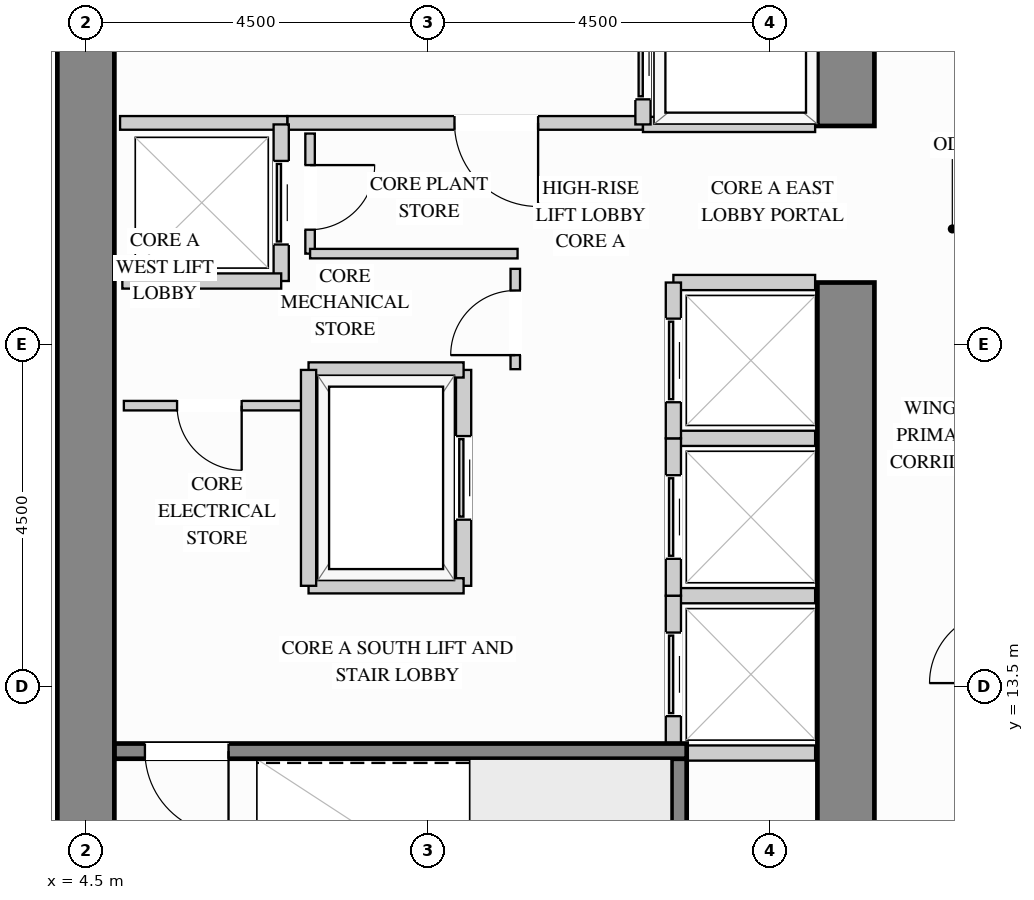
"""IFC4 building model, lengths in metres.
Left out: names, types, materials, properties, quantities, classifications, styles, units other than length and angle.
Written with IfcOpenShell. Run it as: python <this file> out.ifc"""

import sys

from ifc_helpers import new_model, si_unit, direction, frame, frame_2d, origin, place, context, subcontext, project, spatial, rectangle, extrude, source, transform, mapped, element, fill, save


model = new_model("IFC4")
c1 = context("Model", 3, precision=1e-05, world=origin(), true_north=direction((0.0, 1.0)))
c2 = subcontext(c1, "Body", "Model", "MODEL_VIEW")
j1 = project(units=[si_unit("LENGTHUNIT", "METRE"), si_unit("PLANEANGLEUNIT", "RADIAN")], contexts=[c1])
p1 = place(None, origin())
s1 = spatial("IfcSite", under=j1, at=p1, CompositionType="ELEMENT")
p2 = place(p1, origin())
s2 = spatial("IfcBuilding", under=s1, at=p2, CompositionType="ELEMENT")
p3 = place(p2, frame((0.0, 0.0, 99.0)))
s3 = spatial("IfcBuildingStorey", under=s2, at=p3, CompositionType="ELEMENT", Elevation=99.0)
m1 = source(origin(), c2, "Body", "SweptSolid", [
    extrude(rectangle(XDim=9.945, YDim=0.75, at=frame_2d((4.973, 0.0))), origin(), (0.0, 0.0, 1.0), 3.38),
])
p4 = place(p3, frame((14.5, 8.875, 0.0), z_axis=(0.0, 0.0, 1.0), x_axis=(0.0, 1.0, 0.0)))
e1 = element("IfcWall", 1, at=p4, inside=s3, PredefinedType="SHEAR", context=c2, shape_type="MappedRepresentation", body=[
    mapped(m1, transform((0.0, 0.0, 0.0), x_axis=(1.0, 0.0, 0.0), y_axis=(0.0, 1.0, 0.0), z_axis=(0.0, 0.0, 1.0))),
])
m2 = source(origin(), c2, "Body", "SweptSolid", [
    extrude(rectangle(XDim=8.245, YDim=0.75, at=frame_2d((4.123, 0.0))), origin(), (0.0, 0.0, 1.0), 3.38),
])
p5 = place(p3, frame((14.5, 20.88, 0.0), z_axis=(0.0, 0.0, 1.0), x_axis=(0.0, 1.0, 0.0)))
e2 = element("IfcWall", 2, at=p5, inside=s3, PredefinedType="SHEAR", context=c2, shape_type="MappedRepresentation", body=[
    mapped(m2, transform((0.0, 0.0, 0.0), x_axis=(1.0, 0.0, 0.0), y_axis=(0.0, 1.0, 0.0), z_axis=(0.0, 0.0, 1.0))),
])
m3 = source(origin(), c2, "Body", "SweptSolid", [
    extrude(rectangle(XDim=20.25, YDim=0.75, at=frame_2d((10.125, 0.0))), origin(), (0.0, 0.0, 1.0), 3.38),
])
p6 = place(p3, frame((4.5, 8.875, 0.0), z_axis=(0.0, 0.0, 1.0), x_axis=(0.0, 1.0, 0.0)))
e3 = element("IfcWall", 3, at=p6, inside=s3, PredefinedType="SHEAR", context=c2, shape_type="MappedRepresentation", body=[
    mapped(m3, transform((0.0, 0.0, 0.0), x_axis=(1.0, 0.0, 0.0), y_axis=(0.0, 1.0, 0.0), z_axis=(0.0, 0.0, 1.0))),
])
p7 = place(p3, frame((7.15, 20.92, 0.0), z_axis=(0.0, 0.0, 1.0), x_axis=(1.0, 0.0, 0.0)))
e4 = element("IfcWall", 4, at=p7, inside=s3, PredefinedType="PARTITIONING", context=c2, shape_type="SweptSolid", body=[
    extrude(rectangle(XDim=4.68, YDim=0.18, at=frame_2d((2.34, 0.0))), origin(), (0.0, 0.0, 1.0), 3.365),
])
p8 = place(p7, frame((2.2, 0.0, 0.0)))
e5 = element("IfcOpeningElement", 5, at=p8, cuts=e4, PredefinedType="OPENING", context=c2, shape_type="SweptSolid", body=[
    extrude(rectangle(XDim=1.1, YDim=2.15, at=frame_2d((0.55, 1.075))), frame((0.0, 0.1, 0.0), z_axis=(0.0, -1.0, 0.0), x_axis=(1.0, 0.0, 0.0)), (0.0, 0.0, 1.0), 0.2),
])
m4 = source(origin(), c2, "Body", "SweptSolid", [
    extrude(rectangle(XDim=2.2, YDim=0.18, at=frame_2d((1.1, 0.0))), origin(), (0.0, 0.0, 1.0), 3.365),
])
p9 = place(p3, frame((4.95, 20.92, 0.0), z_axis=(0.0, 0.0, 1.0), x_axis=(1.0, 0.0, 0.0)))
e6 = element("IfcWall", 6, at=p9, inside=s3, PredefinedType="PARTITIONING", context=c2, shape_type="MappedRepresentation", body=[
    mapped(m4, transform((0.0, 0.0, 0.0), x_axis=(1.0, 0.0, 0.0), y_axis=(0.0, 1.0, 0.0), z_axis=(0.0, 0.0, 1.0))),
])
p10 = place(p3, frame((10.15, 17.68, 0.0), z_axis=(0.0, 0.0, 1.0), x_axis=(0.0, 1.0, 0.0)))
e7 = element("IfcWall", 7, at=p10, inside=s3, PredefinedType="PARTITIONING", context=c2, shape_type="SweptSolid", body=[
    extrude(rectangle(XDim=1.32, YDim=0.125, at=frame_2d((0.66, 0.0))), origin(), (0.0, 0.0, 1.0), 3.365),
])
p11 = place(p10, frame((0.185, 0.0, 0.0)))
e8 = element("IfcOpeningElement", 8, at=p11, cuts=e7, PredefinedType="OPENING", context=c2, shape_type="SweptSolid", body=[
    extrude(rectangle(XDim=0.85, YDim=2.1, at=frame_2d((0.425, 1.05))), frame((0.0, 0.073, 0.0), z_axis=(0.0, -1.0, 0.0), x_axis=(1.0, 0.0, 0.0)), (0.0, 0.0, 1.0), 0.145),
])
p12 = place(p3, frame((7.45, 19.2, 0.0), z_axis=(0.0, 0.0, 1.0), x_axis=(0.0, 1.0, 0.0)))
e9 = element("IfcWall", 9, at=p12, inside=s3, PredefinedType="PARTITIONING", context=c2, shape_type="SweptSolid", body=[
    extrude(rectangle(XDim=1.58, YDim=0.125, at=frame_2d((0.79, 0.0))), origin(), (0.0, 0.0, 1.0), 3.365),
])
p13 = place(p12, frame((0.315, 0.0, 0.0)))
e10 = element("IfcOpeningElement", 10, at=p13, cuts=e9, PredefinedType="OPENING", context=c2, shape_type="SweptSolid", body=[
    extrude(rectangle(XDim=0.85, YDim=2.1, at=frame_2d((0.425, 1.05))), frame((0.0, 0.073, 0.0), z_axis=(0.0, -1.0, 0.0), x_axis=(1.0, 0.0, 0.0)), (0.0, 0.0, 1.0), 0.145),
])
m5 = source(origin(), c2, "Body", "SweptSolid", [
    extrude(rectangle(XDim=2.73, YDim=0.125, at=frame_2d((1.365, 0.0))), origin(), (0.0, 0.0, 1.0), 3.365),
])
p14 = place(p3, frame((7.45, 19.2, 0.0), z_axis=(0.0, 0.0, 1.0), x_axis=(1.0, 0.0, 0.0)))
e11 = element("IfcWall", 11, at=p14, inside=s3, PredefinedType="PARTITIONING", context=c2, shape_type="MappedRepresentation", body=[
    mapped(m5, transform((0.0, 0.0, 0.0), x_axis=(1.0, 0.0, 0.0), y_axis=(0.0, 1.0, 0.0), z_axis=(0.0, 0.0, 1.0))),
])
p15 = place(p3, frame((5.0, 17.2, 0.0), z_axis=(0.0, 0.0, 1.0), x_axis=(1.0, 0.0, 0.0)))
e12 = element("IfcWall", 12, at=p15, inside=s3, PredefinedType="PARTITIONING", context=c2, shape_type="SweptSolid", body=[
    extrude(rectangle(XDim=2.4, YDim=0.125, at=frame_2d((1.2, 0.0))), origin(), (0.0, 0.0, 1.0), 3.365),
])
p16 = place(p15, frame((0.7, 0.0, 0.0)))
e13 = element("IfcOpeningElement", 13, at=p16, cuts=e12, PredefinedType="OPENING", context=c2, shape_type="SweptSolid", body=[
    extrude(rectangle(XDim=0.85, YDim=2.1, at=frame_2d((0.425, 1.05))), frame((0.0, 0.073, 0.0), z_axis=(0.0, -1.0, 0.0), x_axis=(1.0, 0.0, 0.0)), (0.0, 0.0, 1.0), 0.145),
])
m6 = source(origin(), c2, "Body", "SweptSolid", [
    extrude(rectangle(XDim=2.265, YDim=0.2, at=frame_2d((1.132, 0.0))), origin(), (0.0, 0.0, 1.0), 3.365),
])
p17 = place(p3, frame((11.83, 20.9, 0.0), z_axis=(0.0, 0.0, 1.0), x_axis=(1.0, 0.0, 0.0)))
e14 = element("IfcWall", 14, at=p17, inside=s3, PredefinedType="PARTITIONING", context=c2, shape_type="MappedRepresentation", body=[
    mapped(m6, transform((0.0, 0.0, 0.0), x_axis=(1.0, 0.0, 0.0), y_axis=(0.0, 1.0, 0.0), z_axis=(0.0, 0.0, 1.0))),
])
p18 = place(p3, frame((11.83, 20.9, 0.0), z_axis=(0.0, 0.0, 1.0), x_axis=(0.0, 1.0, 0.0)))
e15 = element("IfcWall", 15, at=p18, inside=s3, PredefinedType="PARTITIONING", context=c2, shape_type="SweptSolid", body=[
    extrude(rectangle(XDim=1.76, YDim=0.2, at=frame_2d((0.88, 0.0))), origin(), (0.0, 0.0, 1.0), 3.365),
])
p19 = place(p18, frame((0.33, 0.0, 0.0)))
e16 = element("IfcOpeningElement", 16, at=p19, cuts=e15, PredefinedType="OPENING", context=c2, shape_type="SweptSolid", body=[
    extrude(rectangle(XDim=1.1, YDim=2.2, at=frame_2d((0.55, 1.1))), frame((0.0, 0.11, 0.0), z_axis=(0.0, -1.0, 0.0), x_axis=(1.0, 0.0, 0.0)), (0.0, 0.0, 1.0), 0.22),
])
m7 = source(origin(), c2, "Body", "SweptSolid", [
    extrude(rectangle(XDim=1.865, YDim=0.2, at=frame_2d((0.933, 0.0))), origin(), (0.0, 0.0, 1.0), 3.365),
])
for number, where, z_axis, x_axis in (
    (17, (12.23, 14.7, 0.0), (0.0, 0.0, 1.0), (1.0, 0.0, 0.0)),
    (18, (12.23, 12.63, 0.0), (0.0, 0.0, 1.0), (1.0, 0.0, 0.0)),
):
    element("IfcWall", number, at=place(p3, frame(where, z_axis=z_axis, x_axis=x_axis)), inside=s3, PredefinedType="PARTITIONING", context=c2, shape_type="MappedRepresentation", body=[
        mapped(m7, transform((0.0, 0.0, 0.0), x_axis=(1.0, 0.0, 0.0), y_axis=(0.0, 1.0, 0.0), z_axis=(0.0, 0.0, 1.0))),
    ])
p20 = place(p3, frame((12.23, 12.63, 0.0), z_axis=(0.0, 0.0, 1.0), x_axis=(0.0, 1.0, 0.0)))
e19 = element("IfcWall", 19, at=p20, inside=s3, PredefinedType="PARTITIONING", context=c2, shape_type="SweptSolid", body=[
    extrude(rectangle(XDim=2.07, YDim=0.2, at=frame_2d((1.035, 0.0))), origin(), (0.0, 0.0, 1.0), 3.365),
])
p21 = place(p20, frame((0.485, 0.0, 0.0)))
e20 = element("IfcOpeningElement", 20, at=p21, cuts=e19, PredefinedType="OPENING", context=c2, shape_type="SweptSolid", body=[
    extrude(rectangle(XDim=1.1, YDim=2.2, at=frame_2d((0.55, 1.1))), frame((0.0, 0.11, 0.0), z_axis=(0.0, -1.0, 0.0), x_axis=(1.0, 0.0, 0.0)), (0.0, 0.0, 1.0), 0.22),
])
p22 = place(p3, frame((12.23, 16.77, 0.0), z_axis=(0.0, 0.0, 1.0), x_axis=(1.0, 0.0, 0.0)))
e21 = element("IfcWall", 21, at=p22, inside=s3, PredefinedType="PARTITIONING", context=c2, shape_type="MappedRepresentation", body=[
    mapped(m7, transform((0.0, 0.0, 0.0), x_axis=(1.0, 0.0, 0.0), y_axis=(0.0, 1.0, 0.0), z_axis=(0.0, 0.0, 1.0))),
])
p23 = place(p3, frame((12.23, 14.7, 0.0), z_axis=(0.0, 0.0, 1.0), x_axis=(0.0, 1.0, 0.0)))
e22 = element("IfcWall", 22, at=p23, inside=s3, PredefinedType="PARTITIONING", context=c2, shape_type="SweptSolid", body=[
    extrude(rectangle(XDim=2.07, YDim=0.2, at=frame_2d((1.035, 0.0))), origin(), (0.0, 0.0, 1.0), 3.365),
])
p24 = place(p23, frame((0.485, 0.0, 0.0)))
e23 = element("IfcOpeningElement", 23, at=p24, cuts=e22, PredefinedType="OPENING", context=c2, shape_type="SweptSolid", body=[
    extrude(rectangle(XDim=1.1, YDim=2.2, at=frame_2d((0.55, 1.1))), frame((0.0, 0.11, 0.0), z_axis=(0.0, -1.0, 0.0), x_axis=(1.0, 0.0, 0.0)), (0.0, 0.0, 1.0), 0.22),
])
p25 = place(p3, frame((12.23, 18.82, 0.0), z_axis=(0.0, 0.0, 1.0), x_axis=(1.0, 0.0, 0.0)))
e24 = element("IfcWall", 24, at=p25, inside=s3, PredefinedType="PARTITIONING", context=c2, shape_type="MappedRepresentation", body=[
    mapped(m7, transform((0.0, 0.0, 0.0), x_axis=(1.0, 0.0, 0.0), y_axis=(0.0, 1.0, 0.0), z_axis=(0.0, 0.0, 1.0))),
])
p26 = place(p3, frame((12.23, 16.77, 0.0), z_axis=(0.0, 0.0, 1.0), x_axis=(0.0, 1.0, 0.0)))
e25 = element("IfcWall", 25, at=p26, inside=s3, PredefinedType="PARTITIONING", context=c2, shape_type="SweptSolid", body=[
    extrude(rectangle(XDim=2.05, YDim=0.2, at=frame_2d((1.025, 0.0))), origin(), (0.0, 0.0, 1.0), 3.365),
])
p27 = place(p26, frame((0.475, 0.0, 0.0)))
e26 = element("IfcOpeningElement", 26, at=p27, cuts=e25, PredefinedType="OPENING", context=c2, shape_type="SweptSolid", body=[
    extrude(rectangle(XDim=1.1, YDim=2.2, at=frame_2d((0.55, 1.1))), frame((0.0, 0.11, 0.0), z_axis=(0.0, -1.0, 0.0), x_axis=(1.0, 0.0, 0.0)), (0.0, 0.0, 1.0), 0.22),
])
p28 = place(p3, frame((7.07, 18.84, 0.0), z_axis=(0.0, 0.0, 1.0), x_axis=(0.0, 1.0, 0.0)))
e27 = element("IfcWall", 27, at=p28, inside=s3, PredefinedType="PARTITIONING", context=c2, shape_type="SweptSolid", body=[
    extrude(rectangle(XDim=2.06, YDim=0.2, at=frame_2d((1.03, 0.0))), origin(), (0.0, 0.0, 1.0), 3.365),
])
p29 = place(p28, frame((0.48, 0.0, 0.0)))
e28 = element("IfcOpeningElement", 28, at=p29, cuts=e27, PredefinedType="OPENING", context=c2, shape_type="SweptSolid", body=[
    extrude(rectangle(XDim=1.1, YDim=2.2, at=frame_2d((0.55, 1.1))), frame((0.0, 0.11, 0.0), z_axis=(0.0, -1.0, 0.0), x_axis=(1.0, 0.0, 0.0)), (0.0, 0.0, 1.0), 0.22),
])
m8 = source(origin(), c2, "Body", "SweptSolid", [
    extrude(rectangle(XDim=2.09, YDim=0.2, at=frame_2d((1.045, 0.0))), origin(), (0.0, 0.0, 1.0), 3.365),
])
p30 = place(p3, frame((4.98, 18.84, 0.0), z_axis=(0.0, 0.0, 1.0), x_axis=(1.0, 0.0, 0.0)))
e29 = element("IfcWall", 29, at=p30, inside=s3, PredefinedType="PARTITIONING", context=c2, shape_type="MappedRepresentation", body=[
    mapped(m8, transform((0.0, 0.0, 0.0), x_axis=(1.0, 0.0, 0.0), y_axis=(0.0, 1.0, 0.0), z_axis=(0.0, 0.0, 1.0))),
])
p31 = place(p3, frame((9.47, 14.83, 0.0), z_axis=(0.0, 0.0, 1.0), x_axis=(0.0, 1.0, 0.0)))
e30 = element("IfcWall", 30, at=p31, inside=s3, PredefinedType="PARTITIONING", context=c2, shape_type="SweptSolid", body=[
    extrude(rectangle(XDim=2.84, YDim=0.2, at=frame_2d((1.42, 0.0))), origin(), (0.0, 0.0, 1.0), 3.365),
])
p32 = place(p31, frame((0.87, 0.0, 0.0)))
e31 = element("IfcOpeningElement", 31, at=p32, cuts=e30, PredefinedType="OPENING", context=c2, shape_type="SweptSolid", body=[
    extrude(rectangle(XDim=1.1, YDim=2.2, at=frame_2d((0.55, 1.1))), frame((0.0, 0.11, 0.0), z_axis=(0.0, -1.0, 0.0), x_axis=(1.0, 0.0, 0.0)), (0.0, 0.0, 1.0), 0.22),
])
m9 = source(origin(), c2, "Body", "SweptSolid", [
    extrude(rectangle(XDim=2.04, YDim=0.2, at=frame_2d((1.02, 0.0))), origin(), (0.0, 0.0, 1.0), 3.365),
])
for number, where, z_axis, x_axis in (
    (32, (7.43, 17.67, 0.0), (0.0, 0.0, 1.0), (1.0, 0.0, 0.0)),
    (33, (7.43, 14.83, 0.0), (0.0, 0.0, 1.0), (1.0, 0.0, 0.0)),
):
    element("IfcWall", number, at=place(p3, frame(where, z_axis=z_axis, x_axis=x_axis)), inside=s3, PredefinedType="PARTITIONING", context=c2, shape_type="MappedRepresentation", body=[
        mapped(m9, transform((0.0, 0.0, 0.0), x_axis=(1.0, 0.0, 0.0), y_axis=(0.0, 1.0, 0.0), z_axis=(0.0, 0.0, 1.0))),
    ])
m10 = source(origin(), c2, "Body", "SweptSolid", [
    extrude(rectangle(XDim=2.84, YDim=0.2, at=frame_2d((1.42, 0.0))), origin(), (0.0, 0.0, 1.0), 3.365),
])
p33 = place(p3, frame((7.43, 14.83, 0.0), z_axis=(0.0, 0.0, 1.0), x_axis=(0.0, 1.0, 0.0)))
e34 = element("IfcWall", 34, at=p33, inside=s3, PredefinedType="PARTITIONING", context=c2, shape_type="MappedRepresentation", body=[
    mapped(m10, transform((0.0, 0.0, 0.0), x_axis=(1.0, 0.0, 0.0), y_axis=(0.0, 1.0, 0.0), z_axis=(0.0, 0.0, 1.0))),
])
m11 = source(origin(), c2, "Body", "SweptSolid", [
    extrude(rectangle(XDim=3.678, YDim=0.2, at=frame_2d((1.839, 0.0))), origin(), (0.0, 0.0, 1.0), 3.38),
])
p34 = place(p3, frame((12.305, 8.877, 0.0), z_axis=(0.0, 0.0, 1.0), x_axis=(0.0, 1.0, 0.0)))
e35 = element("IfcWall", 35, at=p34, inside=s3, PredefinedType="SHEAR", context=c2, shape_type="MappedRepresentation", body=[
    mapped(m11, transform((0.0, 0.0, 0.0), x_axis=(1.0, 0.0, 0.0), y_axis=(0.0, 1.0, 0.0), z_axis=(0.0, 0.0, 1.0))),
])
p35 = place(p3, frame((4.877, 12.655, 0.0), z_axis=(0.0, 0.0, 1.0), x_axis=(1.0, 0.0, 0.0)))
e36 = element("IfcWall", 36, at=p35, inside=s3, PredefinedType="SHEAR", context=c2, shape_type="SweptSolid", body=[
    extrude(rectangle(XDim=7.528, YDim=0.2, at=frame_2d((3.764, 0.0))), origin(), (0.0, 0.0, 1.0), 3.38),
])
p36 = place(p35, frame((0.4, 0.0, 0.0)))
e37 = element("IfcOpeningElement", 37, at=p36, cuts=e36, PredefinedType="OPENING", context=c2, shape_type="SweptSolid", body=[
    extrude(rectangle(XDim=1.1, YDim=2.15, at=frame_2d((0.55, 1.075))), frame((0.0, 0.11, 0.0), z_axis=(0.0, -1.0, 0.0), x_axis=(1.0, 0.0, 0.0)), (0.0, 0.0, 1.0), 0.22),
])
m12 = source(origin(), c2, "Body", "SweptSolid", [
    extrude(rectangle(XDim=1.1, YDim=2.15, at=frame_2d((0.55, 1.075))), frame((0.0, 0.025, 0.0), z_axis=(0.0, -1.0, 0.0), x_axis=(1.0, 0.0, 0.0)), (0.0, 0.0, 1.0), 0.05),
])
p37 = place(p8, origin())
e38 = element("IfcDoor", 38, at=p37, inside=s3, OperationType="SINGLE_SWING_RIGHT", PredefinedType="DOOR", context=c2, shape_type="MappedRepresentation", body=[
    mapped(m12, transform((0.0, 0.0, 0.0), x_axis=(1.0, 0.0, 0.0), y_axis=(0.0, 1.0, 0.0), z_axis=(0.0, 0.0, 1.0))),
])
fill(e5, e38)
m13 = source(origin(), c2, "Body", "SweptSolid", [
    extrude(rectangle(XDim=1.1, YDim=2.2, at=frame_2d((0.55, 1.1))), frame((0.0, 0.025, 0.0), z_axis=(0.0, -1.0, 0.0), x_axis=(1.0, 0.0, 0.0)), (0.0, 0.0, 1.0), 0.05),
])
p38 = place(p19, origin())
e39 = element("IfcDoor", 39, at=p38, inside=s3, OperationType="SLIDING_TO_LEFT", PredefinedType="DOOR", context=c2, shape_type="MappedRepresentation", body=[
    mapped(m13, transform((0.0, 0.0, 0.0), x_axis=(1.0, 0.0, 0.0), y_axis=(0.0, 1.0, 0.0), z_axis=(0.0, 0.0, 1.0))),
])
fill(e16, e39)
p39 = place(p21, origin())
e40 = element("IfcDoor", 40, at=p39, inside=s3, OperationType="SLIDING_TO_LEFT", PredefinedType="DOOR", context=c2, shape_type="MappedRepresentation", body=[
    mapped(m13, transform((0.0, 0.0, 0.0), x_axis=(1.0, 0.0, 0.0), y_axis=(0.0, 1.0, 0.0), z_axis=(0.0, 0.0, 1.0))),
])
fill(e20, e40)
p40 = place(p24, origin())
e41 = element("IfcDoor", 41, at=p40, inside=s3, OperationType="SLIDING_TO_LEFT", PredefinedType="DOOR", context=c2, shape_type="MappedRepresentation", body=[
    mapped(m13, transform((0.0, 0.0, 0.0), x_axis=(1.0, 0.0, 0.0), y_axis=(0.0, 1.0, 0.0), z_axis=(0.0, 0.0, 1.0))),
])
fill(e23, e41)
p41 = place(p27, origin())
e42 = element("IfcDoor", 42, at=p41, inside=s3, OperationType="SLIDING_TO_LEFT", PredefinedType="DOOR", context=c2, shape_type="MappedRepresentation", body=[
    mapped(m13, transform((0.0, 0.0, 0.0), x_axis=(1.0, 0.0, 0.0), y_axis=(0.0, 1.0, 0.0), z_axis=(0.0, 0.0, 1.0))),
])
fill(e26, e42)
p42 = place(p29, origin())
e43 = element("IfcDoor", 43, at=p42, inside=s3, OperationType="SLIDING_TO_LEFT", PredefinedType="DOOR", context=c2, shape_type="MappedRepresentation", body=[
    mapped(m13, transform((0.0, 0.0, 0.0), x_axis=(1.0, 0.0, 0.0), y_axis=(0.0, 1.0, 0.0), z_axis=(0.0, 0.0, 1.0))),
])
fill(e28, e43)
p43 = place(p32, origin())
e44 = element("IfcDoor", 44, at=p43, inside=s3, OperationType="SLIDING_TO_LEFT", PredefinedType="DOOR", context=c2, shape_type="MappedRepresentation", body=[
    mapped(m13, transform((0.0, 0.0, 0.0), x_axis=(1.0, 0.0, 0.0), y_axis=(0.0, 1.0, 0.0), z_axis=(0.0, 0.0, 1.0))),
])
fill(e31, e44)
m14 = source(origin(), c2, "Body", "SweptSolid", [
    extrude(rectangle(XDim=0.85, YDim=2.1, at=frame_2d((0.425, 1.05))), frame((0.0, 0.025, 0.0), z_axis=(0.0, -1.0, 0.0), x_axis=(1.0, 0.0, 0.0)), (0.0, 0.0, 1.0), 0.05),
])
p44 = place(p11, origin())
e45 = element("IfcDoor", 45, at=p44, inside=s3, OperationType="SINGLE_SWING_LEFT", PredefinedType="DOOR", context=c2, shape_type="MappedRepresentation", body=[
    mapped(m14, transform((0.0, 0.0, 0.0), x_axis=(1.0, 0.0, 0.0), y_axis=(0.0, 1.0, 0.0), z_axis=(0.0, 0.0, 1.0))),
])
fill(e8, e45)
p45 = place(p16, origin())
e46 = element("IfcDoor", 46, at=p45, inside=s3, OperationType="SINGLE_SWING_RIGHT", PredefinedType="DOOR", context=c2, shape_type="MappedRepresentation", body=[
    mapped(m14, transform((0.0, 0.0, 0.0), x_axis=(1.0, 0.0, 0.0), y_axis=(0.0, 1.0, 0.0), z_axis=(0.0, 0.0, 1.0))),
])
fill(e13, e46)
p46 = place(p13, origin())
e47 = element("IfcDoor", 47, at=p46, inside=s3, OperationType="SINGLE_SWING_RIGHT", PredefinedType="DOOR", context=c2, shape_type="MappedRepresentation", body=[
    mapped(m14, transform((0.0, 0.0, 0.0), x_axis=(1.0, 0.0, 0.0), y_axis=(0.0, 1.0, 0.0), z_axis=(0.0, 0.0, 1.0))),
])
fill(e10, e47)
m15 = source(origin(), c2, "Body", "SweptSolid", [
    extrude(rectangle(XDim=1.1, YDim=2.15, at=frame_2d((0.55, 1.075))), frame((0.0, 0.025, 0.0), z_axis=(0.0, -1.0, 0.0), x_axis=(1.0, 0.0, 0.0)), (0.0, 0.0, 1.0), 0.05),
])
p47 = place(p36, origin())
e48 = element("IfcDoor", 48, at=p47, inside=s3, OperationType="SINGLE_SWING_RIGHT", PredefinedType="DOOR", context=c2, shape_type="MappedRepresentation", body=[
    mapped(m15, transform((0.0, 0.0, 0.0), x_axis=(1.0, 0.0, 0.0), y_axis=(0.0, 1.0, 0.0), z_axis=(0.0, 0.0, 1.0))),
])
fill(e37, e48)
save(model, sys.argv[1])
